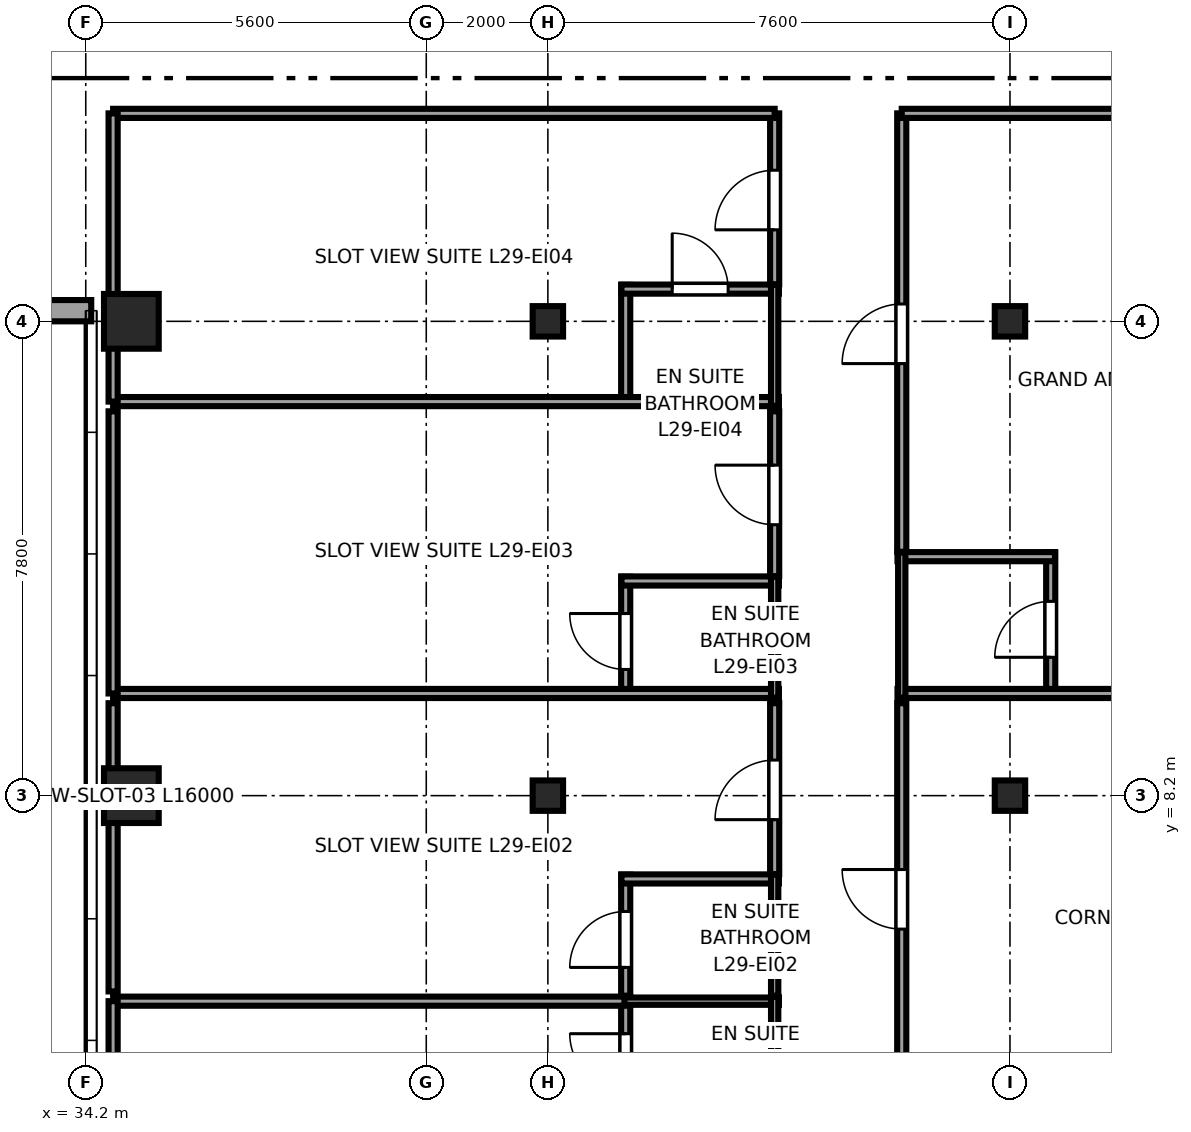
"""IFC4 building model, lengths in metres.
Left out: names, types, materials, properties, quantities, classifications, styles, units other than length and angle.
Written with IfcOpenShell. Run it as: python <this file> out.ifc"""

import sys

from ifc_helpers import new_model, si_unit, direction, frame, frame_2d, origin, origin_2d, place, context, subcontext, project, spatial, rectangle, i_section, extrude, source, transform, mapped, element, fill, save


model = new_model("IFC4")
c1 = context("Model", 3, precision=1e-05, world=origin(), true_north=direction((0.0, 1.0)))
c2 = subcontext(c1, "Body", "Model", "MODEL_VIEW")
j1 = project(units=[si_unit("LENGTHUNIT", "METRE"), si_unit("PLANEANGLEUNIT", "RADIAN")], contexts=[c1])
p1 = place(None, origin())
s1 = spatial("IfcSite", under=j1, at=p1, CompositionType="ELEMENT")
p2 = place(p1, origin())
s2 = spatial("IfcBuilding", under=s1, at=p2, CompositionType="ELEMENT")
p3 = place(p2, frame((0.0, 0.0, 115.1)))
s3 = spatial("IfcBuildingStorey", under=s2, at=p3, CompositionType="ELEMENT", Elevation=115.1)
m1 = source(origin(), c2, "Body", "SweptSolid", [
    extrude(rectangle(XDim=0.9, YDim=0.9, at=origin_2d()), origin(), (0.0, 0.0, 1.0), 3.55),
])
for number, where, z_axis, x_axis in (
    (1, (34.95, 8.2, 0.0), (0.0, 0.0, 1.0), (1.0, 0.0, 0.0)),
    (2, (34.95, 16.0, 0.0), (0.0, 0.0, 1.0), (1.0, 0.0, 0.0)),
):
    element("IfcColumn", number, at=place(p3, frame(where, z_axis=z_axis, x_axis=x_axis)), inside=s3, PredefinedType="COLUMN", context=c2, shape_type="MappedRepresentation", body=[
        mapped(m1, transform((0.0, 0.0, 0.0), x_axis=(1.0, 0.0, 0.0), y_axis=(0.0, 1.0, 0.0), z_axis=(0.0, 0.0, 1.0), scale=1.0)),
    ])
m2 = source(origin(), c2, "Body", "SweptSolid", [
    extrude(i_section(OverallWidth=0.5, OverallDepth=0.5, WebThickness=0.022, FlangeThickness=0.034, at=origin_2d()), origin(), (0.0, 0.0, 1.0), 3.55),
])
for number, where, z_axis, x_axis in (
    (3, (41.8, 8.2, 0.0), (0.0, 0.0, 1.0), (1.0, 0.0, 0.0)),
    (4, (41.8, 16.0, 0.0), (0.0, 0.0, 1.0), (1.0, 0.0, 0.0)),
    (5, (49.4, 8.2, 0.0), (0.0, 0.0, 1.0), (1.0, 0.0, 0.0)),
    (6, (49.4, 16.0, 0.0), (0.0, 0.0, 1.0), (1.0, 0.0, 0.0)),
):
    element("IfcColumn", number, at=place(p3, frame(where, z_axis=z_axis, x_axis=x_axis)), inside=s3, PredefinedType="COLUMN", context=c2, shape_type="MappedRepresentation", body=[
        mapped(m2, transform((0.0, 0.0, 0.0), x_axis=(1.0, 0.0, 0.0), y_axis=(0.0, 1.0, 0.0), z_axis=(0.0, 0.0, 1.0), scale=1.0)),
    ])
p4 = place(p3, frame((22.71, 16.175, 0.0), z_axis=(0.0, 0.0, 1.0), x_axis=(1.0, 0.0, 0.0)))
e7 = element("IfcWall", 7, at=p4, inside=s3, PredefinedType="SOLIDWALL", context=c2, shape_type="SweptSolid", body=[
    extrude(rectangle(XDim=11.58, YDim=0.35, at=frame_2d((5.79, 0.0))), origin(), (0.0, 0.0, 1.0), 2.748),
])
p5 = place(p4, frame((2.295, 0.0, 0.68)))
e8 = element("IfcOpeningElement", 8, at=p5, cuts=e7, PredefinedType="OPENING", context=c2, shape_type="SweptSolid", body=[
    extrude(rectangle(XDim=1.8, YDim=1.85, at=frame_2d((0.9, 0.925))), frame((0.0, 0.185, 0.0), z_axis=(0.0, -1.0, 0.0), x_axis=(1.0, 0.0, 0.0)), (0.0, 0.0, 1.0), 0.37),
])
p6 = place(p4, frame((7.485, 0.0, 0.68)))
e9 = element("IfcOpeningElement", 9, at=p6, cuts=e7, PredefinedType="OPENING", context=c2, shape_type="SweptSolid", body=[
    extrude(rectangle(XDim=1.8, YDim=1.85, at=frame_2d((0.9, 0.925))), frame((0.0, 0.185, 0.0), z_axis=(0.0, -1.0, 0.0), x_axis=(1.0, 0.0, 0.0)), (0.0, 0.0, 1.0), 0.37),
])
p7 = place(p3, frame((43.08, 2.9, 0.0), z_axis=(0.0, 0.0, 1.0), x_axis=(0.0, 1.0, 0.0)))
e10 = element("IfcWall", 10, at=p7, inside=s3, PredefinedType="PARTITIONING", context=c2, shape_type="SweptSolid", body=[
    extrude(rectangle(XDim=1.99, YDim=0.15, at=frame_2d((0.995, 0.0))), origin(), (0.0, 0.0, 1.0), 3.37),
])
p8 = place(p7, frame((0.465, 0.0, 0.0)))
e11 = element("IfcOpeningElement", 11, at=p8, cuts=e10, PredefinedType="OPENING", context=c2, shape_type="SweptSolid", body=[
    extrude(rectangle(XDim=0.92, YDim=2.01, at=frame_2d((0.46, 1.005))), frame((0.0, 0.085, 0.0), z_axis=(0.0, -1.0, 0.0), x_axis=(1.0, 0.0, 0.0)), (0.0, 0.0, 1.0), 0.17),
])
p9 = place(p3, frame((43.01, 4.82, 0.0), z_axis=(0.0, 0.0, 1.0), x_axis=(1.0, 0.0, 0.0)))
e12 = element("IfcWall", 12, at=p9, inside=s3, PredefinedType="PLUMBINGWALL", context=c2, shape_type="SweptSolid", body=[
    extrude(rectangle(XDim=2.59, YDim=0.12, at=frame_2d((1.295, 0.0))), origin(), (0.0, 0.0, 1.0), 3.37),
])
p10 = place(p3, frame((45.53, 2.9, 0.0), z_axis=(0.0, 0.0, 1.0), x_axis=(0.0, 1.0, 0.0)))
e13 = element("IfcWall", 13, at=p10, inside=s3, PredefinedType="PLUMBINGWALL", context=c2, shape_type="SweptSolid", body=[
    extrude(rectangle(XDim=1.99, YDim=0.12, at=frame_2d((0.995, 0.0))), origin(), (0.0, 0.0, 1.0), 3.37),
])
p11 = place(p3, frame((43.08, 4.91, 0.0), z_axis=(0.0, 0.0, 1.0), x_axis=(0.0, 1.0, 0.0)))
e14 = element("IfcWall", 14, at=p11, inside=s3, PredefinedType="PARTITIONING", context=c2, shape_type="SweptSolid", body=[
    extrude(rectangle(XDim=1.99, YDim=0.15, at=frame_2d((0.995, 0.0))), origin(), (0.0, 0.0, 1.0), 3.37),
])
p12 = place(p11, frame((0.465, 0.0, 0.0)))
e15 = element("IfcOpeningElement", 15, at=p12, cuts=e14, PredefinedType="OPENING", context=c2, shape_type="SweptSolid", body=[
    extrude(rectangle(XDim=0.92, YDim=2.01, at=frame_2d((0.46, 1.005))), frame((0.0, 0.085, 0.0), z_axis=(0.0, -1.0, 0.0), x_axis=(1.0, 0.0, 0.0)), (0.0, 0.0, 1.0), 0.17),
])
p13 = place(p3, frame((43.01, 6.83, 0.0), z_axis=(0.0, 0.0, 1.0), x_axis=(1.0, 0.0, 0.0)))
e16 = element("IfcWall", 16, at=p13, inside=s3, PredefinedType="PARTITIONING", context=c2, shape_type="SweptSolid", body=[
    extrude(rectangle(XDim=2.59, YDim=0.15, at=frame_2d((1.295, 0.0))), origin(), (0.0, 0.0, 1.0), 3.37),
])
p14 = place(p3, frame((45.53, 4.91, 0.0), z_axis=(0.0, 0.0, 1.0), x_axis=(0.0, 1.0, 0.0)))
e17 = element("IfcWall", 17, at=p14, inside=s3, PredefinedType="PLUMBINGWALL", context=c2, shape_type="SweptSolid", body=[
    extrude(rectangle(XDim=1.99, YDim=0.12, at=frame_2d((0.995, 0.0))), origin(), (0.0, 0.0, 1.0), 3.37),
])
p15 = place(p3, frame((43.08, 9.81, 0.0), z_axis=(0.0, 0.0, 1.0), x_axis=(0.0, 1.0, 0.0)))
e18 = element("IfcWall", 18, at=p15, inside=s3, PredefinedType="PARTITIONING", context=c2, shape_type="SweptSolid", body=[
    extrude(rectangle(XDim=1.99, YDim=0.15, at=frame_2d((0.995, 0.0))), origin(), (0.0, 0.0, 1.0), 3.37),
])
p16 = place(p15, frame((0.465, 0.0, 0.0)))
e19 = element("IfcOpeningElement", 19, at=p16, cuts=e18, PredefinedType="OPENING", context=c2, shape_type="SweptSolid", body=[
    extrude(rectangle(XDim=0.92, YDim=2.01, at=frame_2d((0.46, 1.005))), frame((0.0, 0.085, 0.0), z_axis=(0.0, -1.0, 0.0), x_axis=(1.0, 0.0, 0.0)), (0.0, 0.0, 1.0), 0.17),
])
p17 = place(p3, frame((34.65, 9.88, 0.0), z_axis=(0.0, 0.0, 1.0), x_axis=(1.0, 0.0, 0.0)))
e20 = element("IfcWall", 20, at=p17, inside=s3, PredefinedType="PARTITIONING", context=c2, shape_type="SweptSolid", body=[
    extrude(rectangle(XDim=10.95, YDim=0.15, at=frame_2d((5.475, 0.0))), origin(), (0.0, 0.0, 1.0), 3.37),
])
p18 = place(p3, frame((43.01, 11.73, 0.0), z_axis=(0.0, 0.0, 1.0), x_axis=(1.0, 0.0, 0.0)))
e21 = element("IfcWall", 21, at=p18, inside=s3, PredefinedType="PARTITIONING", context=c2, shape_type="SweptSolid", body=[
    extrude(rectangle(XDim=2.59, YDim=0.15, at=frame_2d((1.295, 0.0))), origin(), (0.0, 0.0, 1.0), 3.37),
])
p19 = place(p3, frame((45.53, 9.81, 0.0), z_axis=(0.0, 0.0, 1.0), x_axis=(0.0, 1.0, 0.0)))
e22 = element("IfcWall", 22, at=p19, inside=s3, PredefinedType="PLUMBINGWALL", context=c2, shape_type="SweptSolid", body=[
    extrude(rectangle(XDim=1.99, YDim=0.12, at=frame_2d((0.995, 0.0))), origin(), (0.0, 0.0, 1.0), 2.954),
])
p20 = place(p3, frame((43.08, 14.61, 0.0), z_axis=(0.0, 0.0, 1.0), x_axis=(0.0, 1.0, 0.0)))
e23 = element("IfcWall", 23, at=p20, inside=s3, PredefinedType="PARTITIONING", context=c2, shape_type="SweptSolid", body=[
    extrude(rectangle(XDim=1.99, YDim=0.15, at=frame_2d((0.995, 0.0))), origin(), (0.0, 0.0, 1.0), 3.37),
])
p21 = place(p3, frame((34.65, 14.68, 0.0), z_axis=(0.0, 0.0, 1.0), x_axis=(1.0, 0.0, 0.0)))
e24 = element("IfcWall", 24, at=p21, inside=s3, PredefinedType="PARTITIONING", context=c2, shape_type="SweptSolid", body=[
    extrude(rectangle(XDim=10.95, YDim=0.15, at=frame_2d((5.475, 0.0))), origin(), (0.0, 0.0, 1.0), 3.37),
])
p22 = place(p3, frame((43.01, 16.53, 0.0), z_axis=(0.0, 0.0, 1.0), x_axis=(1.0, 0.0, 0.0)))
e25 = element("IfcWall", 25, at=p22, inside=s3, PredefinedType="PARTITIONING", context=c2, shape_type="SweptSolid", body=[
    extrude(rectangle(XDim=2.59, YDim=0.15, at=frame_2d((1.295, 0.0))), origin(), (0.0, 0.0, 1.0), 3.37),
])
p23 = place(p22, frame((0.835, 0.0, 0.0)))
e26 = element("IfcOpeningElement", 26, at=p23, cuts=e25, PredefinedType="OPENING", context=c2, shape_type="SweptSolid", body=[
    extrude(rectangle(XDim=0.92, YDim=2.01, at=frame_2d((0.46, 1.005))), frame((0.0, 0.085, 0.0), z_axis=(0.0, -1.0, 0.0), x_axis=(1.0, 0.0, 0.0)), (0.0, 0.0, 1.0), 0.17),
])
p24 = place(p3, frame((45.53, 14.61, 0.0), z_axis=(0.0, 0.0, 1.0), x_axis=(0.0, 1.0, 0.0)))
e27 = element("IfcWall", 27, at=p24, inside=s3, PredefinedType="PLUMBINGWALL", context=c2, shape_type="SweptSolid", body=[
    extrude(rectangle(XDim=1.99, YDim=0.12, at=frame_2d((0.995, 0.0))), origin(), (0.0, 0.0, 1.0), 2.954),
])
p25 = place(p3, frame((50.07, 9.81, 0.0), z_axis=(0.0, 0.0, 1.0), x_axis=(0.0, 1.0, 0.0)))
e28 = element("IfcWall", 28, at=p25, inside=s3, PredefinedType="PARTITIONING", context=c2, shape_type="SweptSolid", body=[
    extrude(rectangle(XDim=2.39, YDim=0.15, at=frame_2d((1.195, 0.0))), origin(), (0.0, 0.0, 1.0), 3.37),
])
p26 = place(p25, frame((0.665, 0.0, 0.0)))
e29 = element("IfcOpeningElement", 29, at=p26, cuts=e28, PredefinedType="OPENING", context=c2, shape_type="SweptSolid", body=[
    extrude(rectangle(XDim=0.92, YDim=2.01, at=frame_2d((0.46, 1.005))), frame((0.0, 0.085, 0.0), z_axis=(0.0, -1.0, 0.0), x_axis=(1.0, 0.0, 0.0)), (0.0, 0.0, 1.0), 0.17),
])
p27 = place(p3, frame((47.55, 9.88, 0.0), z_axis=(0.0, 0.0, 1.0), x_axis=(1.0, 0.0, 0.0)))
e30 = element("IfcWall", 30, at=p27, inside=s3, PredefinedType="PARTITIONING", context=c2, shape_type="SweptSolid", body=[
    extrude(rectangle(XDim=9.045, YDim=0.15, at=frame_2d((4.522, 0.0))), origin(), (0.0, 0.0, 1.0), 3.37),
])
p28 = place(p3, frame((47.55, 12.13, 0.0), z_axis=(0.0, 0.0, 1.0), x_axis=(1.0, 0.0, 0.0)))
e31 = element("IfcWall", 31, at=p28, inside=s3, PredefinedType="PARTITIONING", context=c2, shape_type="SweptSolid", body=[
    extrude(rectangle(XDim=2.59, YDim=0.15, at=frame_2d((1.295, 0.0))), origin(), (0.0, 0.0, 1.0), 3.37),
])
p29 = place(p3, frame((47.62, 9.81, 0.0), z_axis=(0.0, 0.0, 1.0), x_axis=(0.0, 1.0, 0.0)))
e32 = element("IfcWall", 32, at=p29, inside=s3, PredefinedType="PLUMBINGWALL", context=c2, shape_type="SweptSolid", body=[
    extrude(rectangle(XDim=2.39, YDim=0.12, at=frame_2d((1.195, 0.0))), origin(), (0.0, 0.0, 1.0), 3.37),
])
p30 = place(p3, frame((34.65, 4.82, 0.0), z_axis=(0.0, 0.0, 1.0), x_axis=(1.0, 0.0, 0.0)))
e33 = element("IfcWall", 33, at=p30, inside=s3, PredefinedType="PARTITIONING", context=c2, shape_type="SweptSolid", body=[
    extrude(rectangle(XDim=8.41, YDim=0.15, at=frame_2d((4.205, 0.0))), origin(), (0.0, 0.0, 1.0), 3.37),
])
p31 = place(p3, frame((34.65, 0.405, 0.0), z_axis=(0.0, 0.0, 1.0), x_axis=(0.0, 1.0, 0.0)))
e34 = element("IfcWall", 34, at=p31, inside=s3, PredefinedType="PARTITIONING", context=c2, shape_type="SweptSolid", body=[
    extrude(rectangle(XDim=4.415, YDim=0.15, at=frame_2d((2.208, 0.0))), origin(), (0.0, 0.0, 1.0), 3.37),
])
p32 = place(p3, frame((45.53, 6.91, 0.0), z_axis=(0.0, 0.0, 1.0), x_axis=(0.0, 1.0, 0.0)))
e35 = element("IfcWall", 35, at=p32, inside=s3, PredefinedType="PARTITIONING", context=c2, shape_type="SweptSolid", body=[
    extrude(rectangle(XDim=2.81, YDim=0.15, at=frame_2d((1.405, 0.0))), origin(), (0.0, 0.0, 1.0), 2.954),
])
p33 = place(p32, frame((0.895, 0.0, 0.0)))
e36 = element("IfcOpeningElement", 36, at=p33, cuts=e35, PredefinedType="OPENING", context=c2, shape_type="SweptSolid", body=[
    extrude(rectangle(XDim=0.98, YDim=2.12, at=frame_2d((0.49, 1.06))), frame((0.0, 0.085, 0.0), z_axis=(0.0, -1.0, 0.0), x_axis=(1.0, 0.0, 0.0)), (0.0, 0.0, 1.0), 0.17),
])
p34 = place(p3, frame((34.65, 4.98, 0.0), z_axis=(0.0, 0.0, 1.0), x_axis=(0.0, 1.0, 0.0)))
e37 = element("IfcWall", 37, at=p34, inside=s3, PredefinedType="PARTITIONING", context=c2, shape_type="SweptSolid", body=[
    extrude(rectangle(XDim=4.74, YDim=0.15, at=frame_2d((2.37, 0.0))), origin(), (0.0, 0.0, 1.0), 3.37),
])
p35 = place(p3, frame((45.53, 11.81, 0.0), z_axis=(0.0, 0.0, 1.0), x_axis=(0.0, 1.0, 0.0)))
e38 = element("IfcWall", 38, at=p35, inside=s3, PredefinedType="PARTITIONING", context=c2, shape_type="SweptSolid", body=[
    extrude(rectangle(XDim=2.71, YDim=0.15, at=frame_2d((1.355, 0.0))), origin(), (0.0, 0.0, 1.0), 2.954),
])
p36 = place(p35, frame((0.845, 0.0, 0.0)))
e39 = element("IfcOpeningElement", 39, at=p36, cuts=e38, PredefinedType="OPENING", context=c2, shape_type="SweptSolid", body=[
    extrude(rectangle(XDim=0.98, YDim=2.12, at=frame_2d((0.49, 1.06))), frame((0.0, 0.085, 0.0), z_axis=(0.0, -1.0, 0.0), x_axis=(1.0, 0.0, 0.0)), (0.0, 0.0, 1.0), 0.17),
])
p37 = place(p3, frame((34.65, 9.88, 0.0), z_axis=(0.0, 0.0, 1.0), x_axis=(0.0, 1.0, 0.0)))
e40 = element("IfcWall", 40, at=p37, inside=s3, PredefinedType="PARTITIONING", context=c2, shape_type="SweptSolid", body=[
    extrude(rectangle(XDim=4.64, YDim=0.15, at=frame_2d((2.32, 0.0))), origin(), (0.0, 0.0, 1.0), 3.37),
])
p38 = place(p3, frame((45.53, 16.61, 0.0), z_axis=(0.0, 0.0, 1.0), x_axis=(0.0, 1.0, 0.0)))
e41 = element("IfcWall", 41, at=p38, inside=s3, PredefinedType="PARTITIONING", context=c2, shape_type="SweptSolid", body=[
    extrude(rectangle(XDim=2.81, YDim=0.15, at=frame_2d((1.405, 0.0))), origin(), (0.0, 0.0, 1.0), 2.954),
])
p39 = place(p38, frame((0.895, 0.0, 0.0)))
e42 = element("IfcOpeningElement", 42, at=p39, cuts=e41, PredefinedType="OPENING", context=c2, shape_type="SweptSolid", body=[
    extrude(rectangle(XDim=0.98, YDim=2.12, at=frame_2d((0.49, 1.06))), frame((0.0, 0.085, 0.0), z_axis=(0.0, -1.0, 0.0), x_axis=(1.0, 0.0, 0.0)), (0.0, 0.0, 1.0), 0.17),
])
p40 = place(p3, frame((34.65, 19.42, 0.0), z_axis=(0.0, 0.0, 1.0), x_axis=(1.0, 0.0, 0.0)))
e43 = element("IfcWall", 43, at=p40, inside=s3, PredefinedType="PARTITIONING", context=c2, shape_type="SweptSolid", body=[
    extrude(rectangle(XDim=10.88, YDim=0.15, at=frame_2d((5.44, 0.0))), origin(), (0.0, 0.0, 1.0), 3.37),
])
p41 = place(p3, frame((34.65, 14.68, 0.0), z_axis=(0.0, 0.0, 1.0), x_axis=(0.0, 1.0, 0.0)))
e44 = element("IfcWall", 44, at=p41, inside=s3, PredefinedType="PARTITIONING", context=c2, shape_type="SweptSolid", body=[
    extrude(rectangle(XDim=4.74, YDim=0.15, at=frame_2d((2.37, 0.0))), origin(), (0.0, 0.0, 1.0), 3.37),
])
p42 = place(p3, frame((47.62, 3.31, 0.0), z_axis=(0.0, 0.0, 1.0), x_axis=(0.0, 1.0, 0.0)))
e45 = element("IfcWall", 45, at=p42, inside=s3, PredefinedType="PARTITIONING", context=c2, shape_type="SweptSolid", body=[
    extrude(rectangle(XDim=6.41, YDim=0.15, at=frame_2d((3.205, 0.0))), origin(), (0.0, 0.0, 1.0), 3.37),
])
p43 = place(p42, frame((2.695, 0.0, 0.0)))
e46 = element("IfcOpeningElement", 46, at=p43, cuts=e45, PredefinedType="OPENING", context=c2, shape_type="SweptSolid", body=[
    extrude(rectangle(XDim=0.98, YDim=2.12, at=frame_2d((0.49, 1.06))), frame((0.0, 0.085, 0.0), z_axis=(0.0, -1.0, 0.0), x_axis=(1.0, 0.0, 0.0)), (0.0, 0.0, 1.0), 0.17),
])
p44 = place(p3, frame((47.62, 12.21, 0.0), z_axis=(0.0, 0.0, 1.0), x_axis=(0.0, 1.0, 0.0)))
e47 = element("IfcWall", 47, at=p44, inside=s3, PredefinedType="PARTITIONING", context=c2, shape_type="SweptSolid", body=[
    extrude(rectangle(XDim=7.21, YDim=0.15, at=frame_2d((3.605, 0.0))), origin(), (0.0, 0.0, 1.0), 3.37),
])
p45 = place(p44, frame((3.095, 0.0, 0.0)))
e48 = element("IfcOpeningElement", 48, at=p45, cuts=e47, PredefinedType="OPENING", context=c2, shape_type="SweptSolid", body=[
    extrude(rectangle(XDim=0.98, YDim=2.12, at=frame_2d((0.49, 1.06))), frame((0.0, 0.085, 0.0), z_axis=(0.0, -1.0, 0.0), x_axis=(1.0, 0.0, 0.0)), (0.0, 0.0, 1.0), 0.17),
])
p46 = place(p3, frame((47.62, 19.42, 0.0), z_axis=(0.0, 0.0, 1.0), x_axis=(1.0, 0.0, 0.0)))
e49 = element("IfcWall", 49, at=p46, inside=s3, PredefinedType="PARTITIONING", context=c2, shape_type="SweptSolid", body=[
    extrude(rectangle(XDim=8.975, YDim=0.15, at=frame_2d((4.487, 0.0))), origin(), (0.0, 0.0, 1.0), 3.37),
])
m3 = source(origin(), c2, "Body", "SweptSolid", [
    extrude(rectangle(XDim=0.92, YDim=2.01, at=frame_2d((0.46, 1.005))), frame((0.0, 0.025, 0.0), z_axis=(0.0, -1.0, 0.0), x_axis=(1.0, 0.0, 0.0)), (0.0, 0.0, 1.0), 0.05),
])
p47 = place(p8, origin())
e50 = element("IfcDoor", 50, at=p47, inside=s3, OperationType="SINGLE_SWING_RIGHT", PredefinedType="DOOR", context=c2, shape_type="MappedRepresentation", body=[
    mapped(m3, transform((0.0, 0.0, 0.0), x_axis=(1.0, 0.0, 0.0), y_axis=(0.0, 1.0, 0.0), z_axis=(0.0, 0.0, 1.0), scale=1.0)),
])
fill(e11, e50)
p48 = place(p12, origin())
e51 = element("IfcDoor", 51, at=p48, inside=s3, OperationType="SINGLE_SWING_LEFT", PredefinedType="DOOR", context=c2, shape_type="MappedRepresentation", body=[
    mapped(m3, transform((0.0, 0.0, 0.0), x_axis=(1.0, 0.0, 0.0), y_axis=(0.0, 1.0, 0.0), z_axis=(0.0, 0.0, 1.0), scale=1.0)),
])
fill(e15, e51)
p49 = place(p16, origin())
e52 = element("IfcDoor", 52, at=p49, inside=s3, OperationType="SINGLE_SWING_RIGHT", PredefinedType="DOOR", context=c2, shape_type="MappedRepresentation", body=[
    mapped(m3, transform((0.0, 0.0, 0.0), x_axis=(1.0, 0.0, 0.0), y_axis=(0.0, 1.0, 0.0), z_axis=(0.0, 0.0, 1.0), scale=1.0)),
])
fill(e19, e52)
p50 = place(p23, origin())
e53 = element("IfcDoor", 53, at=p50, inside=s3, OperationType="SINGLE_SWING_LEFT", PredefinedType="DOOR", context=c2, shape_type="MappedRepresentation", body=[
    mapped(m3, transform((0.0, 0.0, 0.0), x_axis=(1.0, 0.0, 0.0), y_axis=(0.0, 1.0, 0.0), z_axis=(0.0, 0.0, 1.0), scale=1.0)),
])
fill(e26, e53)
p51 = place(p26, origin())
e54 = element("IfcDoor", 54, at=p51, inside=s3, OperationType="SINGLE_SWING_LEFT", PredefinedType="DOOR", context=c2, shape_type="MappedRepresentation", body=[
    mapped(m3, transform((0.0, 0.0, 0.0), x_axis=(1.0, 0.0, 0.0), y_axis=(0.0, 1.0, 0.0), z_axis=(0.0, 0.0, 1.0), scale=1.0)),
])
fill(e29, e54)
m4 = source(origin(), c2, "Body", "SweptSolid", [
    extrude(rectangle(XDim=0.98, YDim=2.12, at=frame_2d((0.49, 1.06))), frame((0.0, 0.025, 0.0), z_axis=(0.0, -1.0, 0.0), x_axis=(1.0, 0.0, 0.0)), (0.0, 0.0, 1.0), 0.05),
])
p52 = place(p33, origin())
e55 = element("IfcDoor", 55, at=p52, inside=s3, OperationType="SINGLE_SWING_LEFT", PredefinedType="DOOR", context=c2, shape_type="MappedRepresentation", body=[
    mapped(m4, transform((0.0, 0.0, 0.0), x_axis=(1.0, 0.0, 0.0), y_axis=(0.0, 1.0, 0.0), z_axis=(0.0, 0.0, 1.0), scale=1.0)),
])
fill(e36, e55)
p53 = place(p36, origin())
e56 = element("IfcDoor", 56, at=p53, inside=s3, OperationType="SINGLE_SWING_RIGHT", PredefinedType="DOOR", context=c2, shape_type="MappedRepresentation", body=[
    mapped(m4, transform((0.0, 0.0, 0.0), x_axis=(1.0, 0.0, 0.0), y_axis=(0.0, 1.0, 0.0), z_axis=(0.0, 0.0, 1.0), scale=1.0)),
])
fill(e39, e56)
p54 = place(p39, origin())
e57 = element("IfcDoor", 57, at=p54, inside=s3, OperationType="SINGLE_SWING_LEFT", PredefinedType="DOOR", context=c2, shape_type="MappedRepresentation", body=[
    mapped(m4, transform((0.0, 0.0, 0.0), x_axis=(1.0, 0.0, 0.0), y_axis=(0.0, 1.0, 0.0), z_axis=(0.0, 0.0, 1.0), scale=1.0)),
])
fill(e42, e57)
p55 = place(p43, origin())
e58 = element("IfcDoor", 58, at=p55, inside=s3, OperationType="SINGLE_SWING_RIGHT", PredefinedType="DOOR", context=c2, shape_type="MappedRepresentation", body=[
    mapped(m4, transform((0.0, 0.0, 0.0), x_axis=(1.0, 0.0, 0.0), y_axis=(0.0, 1.0, 0.0), z_axis=(0.0, 0.0, 1.0), scale=1.0)),
])
fill(e46, e58)
p56 = place(p45, origin())
e59 = element("IfcDoor", 59, at=p56, inside=s3, OperationType="SINGLE_SWING_LEFT", PredefinedType="DOOR", context=c2, shape_type="MappedRepresentation", body=[
    mapped(m4, transform((0.0, 0.0, 0.0), x_axis=(1.0, 0.0, 0.0), y_axis=(0.0, 1.0, 0.0), z_axis=(0.0, 0.0, 1.0), scale=1.0)),
])
fill(e48, e59)
save(model, sys.argv[1])
